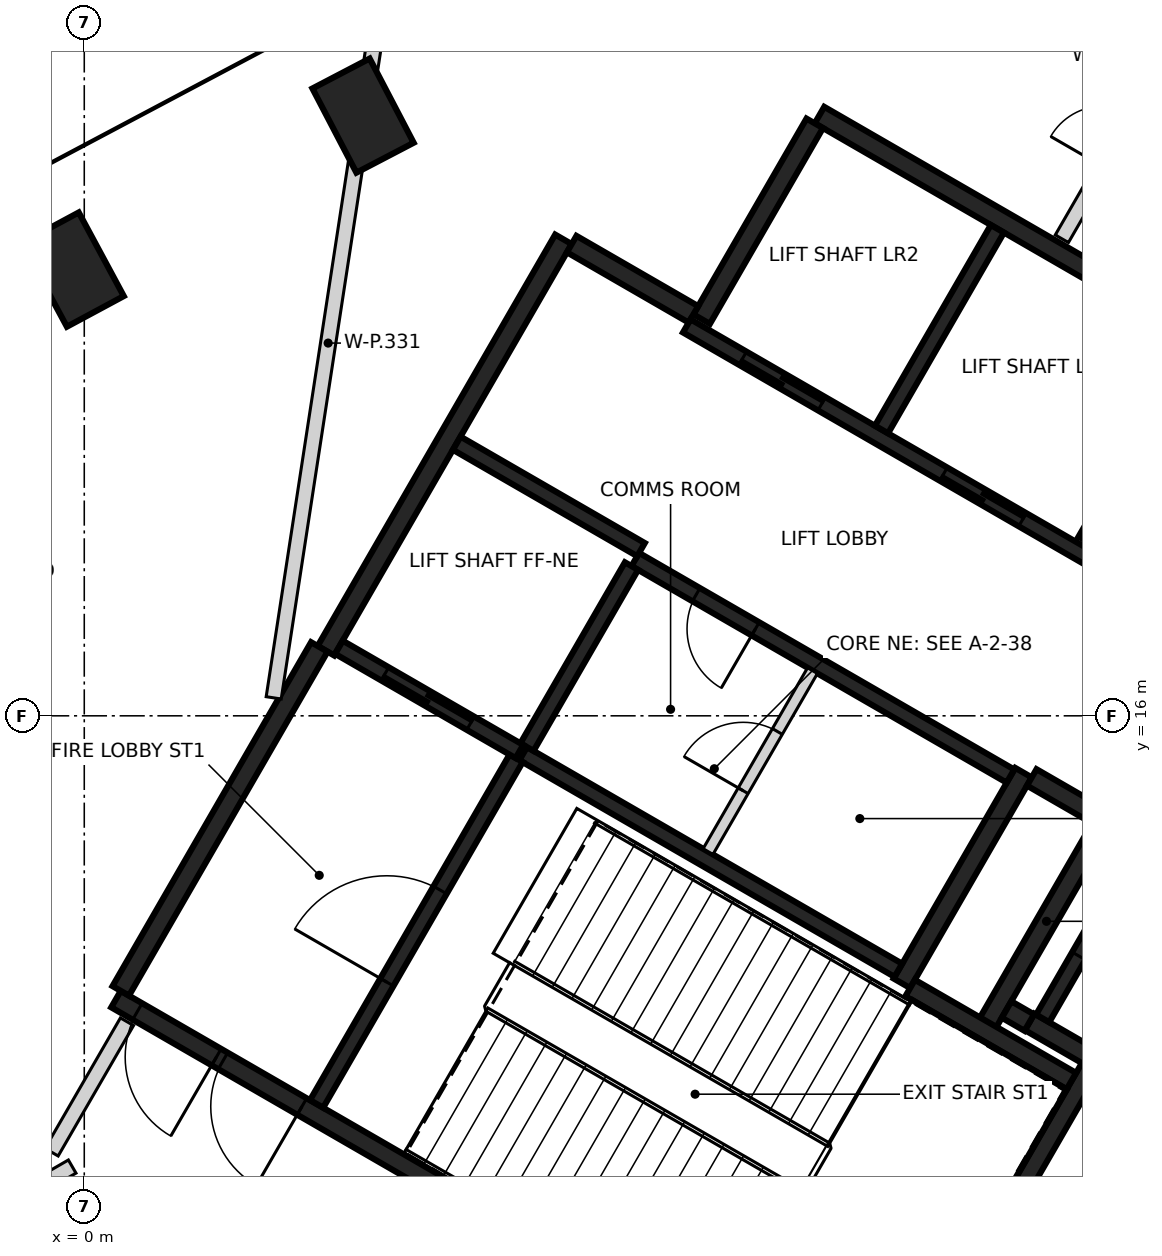
"""IFC4 building model, lengths in metres.
Left out: names, types, materials, properties, quantities, classifications, styles, units other than length and angle.
Written with IfcOpenShell. Run it as: python <this file> out.ifc"""

import sys

from ifc_helpers import new_model, si_unit, direction, frame, frame_2d, origin, origin_2d, place, context, subcontext, project, spatial, rectangle, extrude, element, fill, save


model = new_model("IFC4")
c1 = context("Model", 3, precision=1e-05, world=origin(), true_north=direction((0.0, 1.0)))
c2 = subcontext(c1, "Body", "Model", "MODEL_VIEW")
j1 = project(units=[si_unit("LENGTHUNIT", "METRE"), si_unit("PLANEANGLEUNIT", "RADIAN")], contexts=[c1])
p1 = place(None, origin())
s1 = spatial("IfcSite", under=j1, at=p1, CompositionType="ELEMENT")
p2 = place(p1, origin())
s2 = spatial("IfcBuilding", under=s1, at=p2, CompositionType="ELEMENT")
p3 = place(p2, frame((0.0, 0.0, 123.8)))
s3 = spatial("IfcBuildingStorey", under=s2, at=p3, CompositionType="ELEMENT", Elevation=123.8)
for number, where, z_axis, x_axis in (
    (1, (3.667, 23.896, -0.4), (0.0, 0.0, 1.0), (-0.463, 0.886, 0.0)),
    (2, (-0.151, 21.871, -0.4), (0.0, 0.0, 1.0), (-0.474, 0.881, 0.0)),
):
    element("IfcColumn", number, at=place(p3, frame(where, z_axis=z_axis, x_axis=x_axis)), inside=s3, PredefinedType="COLUMN", context=c2, shape_type="SweptSolid", body=[
        extrude(rectangle(XDim=1.25, YDim=0.85, at=origin_2d()), origin(), (0.0, 0.0, 1.0), 5.0),
    ])
p4 = place(p3, frame((15.207, 26.34, -0.4), z_axis=(0.0, 0.0, 1.0), x_axis=(0.5, 0.866025403784, 0.0)))
e3 = element("IfcColumn", 3, at=p4, inside=s3, PredefinedType="COLUMN", context=c2, shape_type="SweptSolid", body=[
    extrude(rectangle(XDim=3.6, YDim=3.0, at=origin_2d()), origin(), (0.0, 0.0, 1.0), 5.0),
])
p5 = place(p3, frame((10.42, 6.498, 0.0), z_axis=(0.0, 0.0, 1.0), x_axis=(-0.866021906294, 0.500006057782, 0.0)))
e4 = element("IfcWall", 4, at=p5, inside=s3, PredefinedType="SHEAR", context=c2, shape_type="SweptSolid", body=[
    extrude(rectangle(XDim=11.55, YDim=0.25, at=frame_2d((5.775, 0.0))), origin(), (0.0, 0.0, 1.0), 4.6),
])
p6 = place(p5, frame((10.025, 0.0, 0.0)))
e5 = element("IfcOpeningElement", 5, at=p6, cuts=e4, PredefinedType="OPENING", context=c2, shape_type="SweptSolid", body=[
    extrude(rectangle(XDim=1.2, YDim=2.1, at=frame_2d((0.6, 1.05))), frame((0.0, 0.135, 0.0), z_axis=(0.0, -1.0, 0.0), x_axis=(1.0, 0.0, 0.0)), (0.0, 0.0, 1.0), 0.27),
])
p7 = place(p5, frame((8.725, 0.0, 0.0)))
e6 = element("IfcOpeningElement", 6, at=p7, cuts=e4, PredefinedType="OPENING", context=c2, shape_type="SweptSolid", body=[
    extrude(rectangle(XDim=1.2, YDim=2.1, at=frame_2d((0.6, 1.05))), frame((0.0, 0.135, 0.0), z_axis=(0.0, -1.0, 0.0), x_axis=(1.0, 0.0, 0.0)), (0.0, 0.0, 1.0), 0.27),
])
p8 = place(p3, frame((3.179, 16.856, 0.0), z_axis=(0.0, 0.0, 1.0), x_axis=(0.500004234368, 0.866022959057, 0.0)))
e7 = element("IfcWall", 7, at=p8, inside=s3, PredefinedType="SHEAR", context=c2, shape_type="SweptSolid", body=[
    extrude(rectangle(XDim=6.25, YDim=0.25, at=frame_2d((3.125, 0.0))), origin(), (0.0, 0.0, 1.0), 4.6),
])
p9 = place(p3, frame((9.673, 23.903, 0.0), z_axis=(0.0, 0.0, 1.0), x_axis=(0.86603616409, -0.499981362141, 0.0)))
e8 = element("IfcWall", 8, at=p9, inside=s3, PredefinedType="SHEAR", context=c2, shape_type="SweptSolid", body=[
    extrude(rectangle(XDim=5.85, YDim=0.25, at=frame_2d((2.925, 0.0))), origin(), (0.0, 0.0, 1.0), 4.6),
])
p10 = place(p3, frame((0.48, 12.381, 0.0), z_axis=(0.0, 0.0, 1.0), x_axis=(0.49999885962, 0.866026062182, 0.0)))
e9 = element("IfcWall", 9, at=p10, inside=s3, PredefinedType="SHEAR", context=c2, shape_type="SweptSolid", body=[
    extrude(rectangle(XDim=5.225, YDim=0.25, at=frame_2d((2.612, 0.0))), origin(), (0.0, 0.0, 1.0), 4.6),
])
p11 = place(p3, frame((13.238, 11.378, 0.0), z_axis=(0.0, 0.0, 1.0), x_axis=(-0.500008851346, -0.866020293397, 0.0)))
e10 = element("IfcWall", 10, at=p11, inside=s3, PredefinedType="SHEAR", context=c2, shape_type="SweptSolid", body=[
    extrude(rectangle(XDim=5.51, YDim=0.25, at=frame_2d((2.755, 0.0))), origin(), (0.0, 0.0, 1.0), 4.6),
])
p12 = place(p3, frame((12.357, 15.252, 0.0), z_axis=(0.0, 0.0, 1.0), x_axis=(-0.500028443584, -0.866008981251, 0.0)))
e11 = element("IfcWall", 11, at=p12, inside=s3, PredefinedType="SHEAR", context=c2, shape_type="SweptSolid", body=[
    extrude(rectangle(XDim=3.2, YDim=0.25, at=frame_2d((1.6, 0.0))), origin(), (0.0, 0.0, 1.0), 4.6),
])
for number, where, z_axis, x_axis in (
    (12, (8.123, 21.219, 0.0), (0.0, 0.0, 1.0), (0.5, 0.866, 0.0)),
    (13, (14.676, 20.87, 0.0), (0.0, 0.0, 1.0), (-0.5, -0.866, 0.0)),
):
    element("IfcWall", number, at=place(p3, frame(where, z_axis=z_axis, x_axis=x_axis)), inside=s3, PredefinedType="SHEAR", context=c2, shape_type="SweptSolid", body=[
        extrude(rectangle(XDim=2.975, YDim=0.25, at=frame_2d((1.487, 0.0))), origin(), (0.0, 0.0, 1.0), 4.6),
    ])
p13 = place(p3, frame((14.918, 10.54, 0.0), z_axis=(0.0, 0.0, 1.0), x_axis=(-0.866063538972, 0.499933942099, 0.0)))
e14 = element("IfcWall", 14, at=p13, inside=s3, PredefinedType="SHEAR", context=c2, shape_type="SweptSolid", body=[
    extrude(rectangle(XDim=2.865, YDim=0.25, at=frame_2d((1.432, 0.0))), origin(), (0.0, 0.0, 1.0), 4.6),
])
p14 = place(p3, frame((11.888, 11.961, 0.0), z_axis=(0.0, 0.0, 1.0), x_axis=(0.500003324108, 0.866023484601, 0.0)))
e15 = element("IfcWall", 15, at=p14, inside=s3, PredefinedType="SHEAR", context=c2, shape_type="SweptSolid", body=[
    extrude(rectangle(XDim=3.085, YDim=0.25, at=frame_2d((1.542, 0.0))), origin(), (0.0, 0.0, 1.0), 4.6),
])
p15 = place(p3, frame((10.865, 12.418, 0.0), z_axis=(0.0, 0.0, 1.0), x_axis=(0.866026229868, -0.499998569178, 0.0)))
e16 = element("IfcWall", 16, at=p15, inside=s3, PredefinedType="SHEAR", context=c2, shape_type="SweptSolid", body=[
    extrude(rectangle(XDim=2.449, YDim=0.25, at=frame_2d((1.225, 0.0))), origin(), (0.0, 0.0, 1.0), 4.6),
])
p16 = place(p3, frame((6.413, 22.206, 0.0), z_axis=(0.0, 0.0, 1.0), x_axis=(0.866016279763, -0.500015802937, 0.0)))
e17 = element("IfcWall", 17, at=p16, inside=s3, PredefinedType="SHEAR", context=c2, shape_type="SweptSolid", body=[
    extrude(rectangle(XDim=1.849, YDim=0.25, at=frame_2d((0.925, 0.0))), origin(), (0.0, 0.0, 1.0), 4.6),
])
p17 = place(p3, frame((13.322, 14.695, 0.0), z_axis=(0.0, 0.0, 1.0), x_axis=(-0.866017078145, 0.500014420154, 0.0)))
e18 = element("IfcWall", 18, at=p17, inside=s3, PredefinedType="SHEAR", context=c2, shape_type="SweptSolid", body=[
    extrude(rectangle(XDim=0.989, YDim=0.25, at=frame_2d((0.495, 0.0))), origin(), (0.0, 0.0, 1.0), 4.6),
])
p18 = place(p3, frame((12.433, 11.964, 0.0), z_axis=(0.0, 0.0, 1.0), x_axis=(-0.866055875208, 0.499947218231, 0.0)))
e19 = element("IfcWall", 19, at=p18, inside=s3, PredefinedType="SHEAR", context=c2, shape_type="SweptSolid", body=[
    extrude(rectangle(XDim=0.345, YDim=0.25, at=frame_2d((0.172, 0.0))), origin(), (0.0, 0.0, 1.0), 4.6),
])
p19 = place(p3, frame((13.21, 18.08, 0.0), z_axis=(0.0, 0.0, 1.0), x_axis=(-0.866030299012, 0.499991521122, 0.0)))
e20 = element("IfcWall", 20, at=p19, inside=s3, PredefinedType="SHEAR", context=c2, shape_type="SweptSolid", body=[
    extrude(rectangle(XDim=6.1, YDim=0.2, at=frame_2d((3.05, 0.0))), origin(), (0.0, 0.0, 1.0), 4.6),
])
p20 = place(p19, frame((1.0, 0.0, 0.0)))
e21 = element("IfcOpeningElement", 21, at=p20, cuts=e20, PredefinedType="OPENING", context=c2, shape_type="SweptSolid", body=[
    extrude(rectangle(XDim=1.2, YDim=2.1, at=frame_2d((0.6, 1.05))), frame((0.0, 0.11, 0.0), z_axis=(0.0, -1.0, 0.0), x_axis=(1.0, 0.0, 0.0)), (0.0, 0.0, 1.0), 0.22),
])
p21 = place(p19, frame((4.05, 0.0, 0.0)))
e22 = element("IfcOpeningElement", 22, at=p21, cuts=e20, PredefinedType="OPENING", context=c2, shape_type="SweptSolid", body=[
    extrude(rectangle(XDim=1.2, YDim=2.1, at=frame_2d((0.6, 1.05))), frame((0.0, 0.11, 0.0), z_axis=(0.0, -1.0, 0.0), x_axis=(1.0, 0.0, 0.0)), (0.0, 0.0, 1.0), 0.22),
])
p22 = place(p3, frame((5.775, 15.502, 0.0), z_axis=(0.0, 0.0, 1.0), x_axis=(0.866020080793, -0.500009219579, 0.0)))
e23 = element("IfcWall", 23, at=p22, inside=s3, PredefinedType="SHEAR", context=c2, shape_type="SweptSolid", body=[
    extrude(rectangle(XDim=5.699, YDim=0.2, at=frame_2d((2.85, 0.0))), origin(), (0.0, 0.0, 1.0), 4.6),
])
p23 = place(p3, frame((12.185, 15.207, 0.0), z_axis=(0.0, 0.0, 1.0), x_axis=(-0.866020080793, 0.500009219579, 0.0)))
e24 = element("IfcWall", 24, at=p23, inside=s3, PredefinedType="SHEAR", context=c2, shape_type="SweptSolid", body=[
    extrude(rectangle(XDim=5.699, YDim=0.2, at=frame_2d((2.85, 0.0))), origin(), (0.0, 0.0, 1.0), 4.6),
])
p24 = place(p23, frame((3.874, 0.0, 0.0)))
e25 = element("IfcOpeningElement", 25, at=p24, cuts=e24, PredefinedType="OPENING", context=c2, shape_type="SweptSolid", body=[
    extrude(rectangle(XDim=0.9, YDim=2.1, at=frame_2d((0.45, 1.05))), frame((0.0, 0.11, 0.0), z_axis=(0.0, -1.0, 0.0), x_axis=(1.0, 0.0, 0.0)), (0.0, 0.0, 1.0), 0.22),
])
p25 = place(p3, frame((3.057, 10.895, 0.0), z_axis=(0.0, 0.0, 1.0), x_axis=(0.499989418164, 0.866031513124, 0.0)))
e26 = element("IfcWall", 26, at=p25, inside=s3, PredefinedType="SHEAR", context=c2, shape_type="SweptSolid", body=[
    extrude(rectangle(XDim=5.251, YDim=0.2, at=frame_2d((2.625, 0.0))), origin(), (0.0, 0.0, 1.0), 4.6),
])
p26 = place(p25, frame((1.849, 0.0, 0.0)))
e27 = element("IfcOpeningElement", 27, at=p26, cuts=e26, PredefinedType="OPENING", context=c2, shape_type="SweptSolid", body=[
    extrude(rectangle(XDim=1.4, YDim=2.1, at=frame_2d((0.7, 1.05))), frame((0.0, 0.11, 0.0), z_axis=(0.0, -1.0, 0.0), x_axis=(1.0, 0.0, 0.0)), (0.0, 0.0, 1.0), 0.22),
])
p27 = place(p3, frame((10.489, 19.767, 0.0), z_axis=(0.0, 0.0, 1.0), x_axis=(0.499946628782, 0.866056215479, 0.0)))
e28 = element("IfcWall", 28, at=p27, inside=s3, PredefinedType="SHEAR", context=c2, shape_type="SweptSolid", body=[
    extrude(rectangle(XDim=3.048, YDim=0.2, at=frame_2d((1.524, 0.0))), origin(), (0.0, 0.0, 1.0), 4.6),
])
p28 = place(p3, frame((14.008, 14.442, 0.0), z_axis=(0.0, 0.0, 1.0), x_axis=(-0.499986818241, -0.866033014143, 0.0)))
e29 = element("IfcWall", 29, at=p28, inside=s3, PredefinedType="SHEAR", context=c2, shape_type="SweptSolid", body=[
    extrude(rectangle(XDim=2.798, YDim=0.2, at=frame_2d((1.399, 0.0))), origin(), (0.0, 0.0, 1.0), 4.6),
])
p29 = place(p28, frame((0.949, 0.0, 0.0)))
e30 = element("IfcOpeningElement", 30, at=p29, cuts=e29, PredefinedType="OPENING", context=c2, shape_type="SweptSolid", body=[
    extrude(rectangle(XDim=0.9, YDim=2.1, at=frame_2d((0.45, 1.05))), frame((0.0, 0.11, 0.0), z_axis=(0.0, -1.0, 0.0), x_axis=(1.0, 0.0, 0.0)), (0.0, 0.0, 1.0), 0.22),
])
p30 = place(p3, frame((7.199, 17.97, 0.0), z_axis=(0.0, 0.0, 1.0), x_axis=(-0.499968400327, -0.866043647095, 0.0)))
e31 = element("IfcWall", 31, at=p30, inside=s3, PredefinedType="SHEAR", context=c2, shape_type="SweptSolid", body=[
    extrude(rectangle(XDim=2.75, YDim=0.2, at=frame_2d((1.375, 0.0))), origin(), (0.0, 0.0, 1.0), 4.6),
])
p31 = place(p3, frame((5.725, 15.531, 0.0), z_axis=(0.0, 0.0, 1.0), x_axis=(-0.866037306777, 0.499979382845, 0.0)))
e32 = element("IfcWall", 32, at=p31, inside=s3, PredefinedType="SHEAR", context=c2, shape_type="SweptSolid", body=[
    extrude(rectangle(XDim=2.742, YDim=0.2, at=frame_2d((1.371, 0.0))), origin(), (0.0, 0.0, 1.0), 4.6),
])
p32 = place(p31, frame((0.743, 0.0, 0.0)))
e33 = element("IfcOpeningElement", 33, at=p32, cuts=e32, PredefinedType="OPENING", context=c2, shape_type="SweptSolid", body=[
    extrude(rectangle(XDim=1.3, YDim=2.1, at=frame_2d((0.65, 1.05))), frame((0.0, 0.11, 0.0), z_axis=(0.0, -1.0, 0.0), x_axis=(1.0, 0.0, 0.0)), (0.0, 0.0, 1.0), 0.22),
])
p33 = place(p3, frame((4.901, 19.586, 0.0), z_axis=(0.0, 0.0, 1.0), x_axis=(0.866022890907, -0.500004352405, 0.0)))
e34 = element("IfcWall", 34, at=p33, inside=s3, PredefinedType="SHEAR", context=c2, shape_type="SweptSolid", body=[
    extrude(rectangle(XDim=2.799, YDim=0.2, at=frame_2d((1.399, 0.0))), origin(), (0.0, 0.0, 1.0), 4.6),
])
p34 = place(p3, frame((8.207, 14.214, 0.0), z_axis=(0.0, 0.0, 1.0), x_axis=(0.499922376475, 0.866070215109, 0.0)))
e35 = element("IfcWall", 35, at=p34, inside=s3, PredefinedType="PARTITIONING", context=c2, shape_type="SweptSolid", body=[
    extrude(rectangle(XDim=2.749, YDim=0.15, at=frame_2d((1.374, 0.0))), origin(), (0.0, 0.0, 1.0), 4.6),
])
p35 = place(p34, frame((0.924, 0.0, 0.0)))
e36 = element("IfcOpeningElement", 36, at=p35, cuts=e35, PredefinedType="OPENING", context=c2, shape_type="SweptSolid", body=[
    extrude(rectangle(XDim=0.9, YDim=2.1, at=frame_2d((0.45, 1.05))), frame((0.0, 0.085, 0.0), z_axis=(0.0, -1.0, 0.0), x_axis=(1.0, 0.0, 0.0)), (0.0, 0.0, 1.0), 0.17),
])
p36 = place(p3, frame((-7.674, 5.728, 0.0), z_axis=(0.0, 0.0, 1.0), x_axis=(0.865879153223, 0.50025322789, 0.0)))
e37 = element("IfcWall", 37, at=p36, inside=s3, PredefinedType="PARTITIONING", context=c2, shape_type="SweptSolid", body=[
    extrude(rectangle(XDim=8.679, YDim=0.2, at=frame_2d((4.34, 0.0))), origin(), (0.0, 0.0, 1.0), 4.6),
])
p37 = place(p36, frame((6.16, 0.0, 0.0)))
e38 = element("IfcOpeningElement", 38, at=p37, cuts=e37, PredefinedType="OPENING", context=c2, shape_type="SweptSolid", body=[
    extrude(rectangle(XDim=2.0, YDim=2.1, at=frame_2d((1.0, 1.05))), frame((0.0, 0.11, 0.0), z_axis=(0.0, -1.0, 0.0), x_axis=(1.0, 0.0, 0.0)), (0.0, 0.0, 1.0), 0.22),
])
p38 = place(p36, frame((3.77, 0.0, 0.0)))
e39 = element("IfcOpeningElement", 39, at=p38, cuts=e37, PredefinedType="OPENING", context=c2, shape_type="SweptSolid", body=[
    extrude(rectangle(XDim=0.9, YDim=2.1, at=frame_2d((0.45, 1.05))), frame((0.0, 0.11, 0.0), z_axis=(0.0, -1.0, 0.0), x_axis=(1.0, 0.0, 0.0)), (0.0, 0.0, 1.0), 0.22),
])
p39 = place(p3, frame((-0.43, 10.259, 0.0), z_axis=(0.0, 0.0, 1.0), x_axis=(0.500283752163, 0.865861517404, 0.0)))
e40 = element("IfcWall", 40, at=p39, inside=s3, PredefinedType="PARTITIONING", context=c2, shape_type="SweptSolid", body=[
    extrude(rectangle(XDim=1.983, YDim=0.2, at=frame_2d((0.991, 0.0))), origin(), (0.0, 0.0, 1.0), 4.6),
])
p40 = place(p3, frame((2.492, 16.236, 0.0), z_axis=(0.0, 0.0, 1.0), x_axis=(0.151721108942, 0.988423343058, 0.0)))
e41 = element("IfcWall", 41, at=p40, inside=s3, PredefinedType="PARTITIONING", context=c2, shape_type="SweptSolid", body=[
    extrude(rectangle(XDim=9.444, YDim=0.2, at=frame_2d((4.722, 0.0))), origin(), (0.0, 0.0, 1.0), 4.6),
])
p41 = place(p3, frame((12.861, 22.276, 0.0), z_axis=(0.0, 0.0, 1.0), x_axis=(0.500132837022, 0.865948696709, 0.0)))
e42 = element("IfcWall", 42, at=p41, inside=s3, PredefinedType="PARTITIONING", context=c2, shape_type="SweptSolid", body=[
    extrude(rectangle(XDim=7.587, YDim=0.2, at=frame_2d((3.793, 0.0))), origin(), (0.0, 0.0, 1.0), 4.6),
])
p42 = place(p41, frame((1.092, 0.0, 0.0)))
e43 = element("IfcOpeningElement", 43, at=p42, cuts=e42, PredefinedType="OPENING", context=c2, shape_type="SweptSolid", body=[
    extrude(rectangle(XDim=0.8, YDim=2.1, at=frame_2d((0.4, 1.05))), frame((0.0, 0.11, 0.0), z_axis=(0.0, -1.0, 0.0), x_axis=(1.0, 0.0, 0.0)), (0.0, 0.0, 1.0), 0.22),
])
p43 = place(p32, origin())
e44 = element("IfcDoor", 44, at=p43, inside=s3, OperationType="SLIDING_TO_RIGHT", PredefinedType="DOOR", context=c2, shape_type="SweptSolid", body=[
    extrude(rectangle(XDim=1.3, YDim=2.1, at=frame_2d((0.65, 1.05))), frame((0.0, 0.025, 0.0), z_axis=(0.0, -1.0, 0.0), x_axis=(1.0, 0.0, 0.0)), (0.0, 0.0, 1.0), 0.05),
])
fill(e33, e44)
p44 = place(p20, origin())
e45 = element("IfcDoor", 45, at=p44, inside=s3, OperationType="DOUBLE_DOOR_SLIDING", PredefinedType="DOOR", context=c2, shape_type="SweptSolid", body=[
    extrude(rectangle(XDim=1.2, YDim=2.1, at=frame_2d((0.6, 1.05))), frame((0.0, 0.025, 0.0), z_axis=(0.0, -1.0, 0.0), x_axis=(1.0, 0.0, 0.0)), (0.0, 0.0, 1.0), 0.05),
])
fill(e21, e45)
p45 = place(p21, origin())
e46 = element("IfcDoor", 46, at=p45, inside=s3, OperationType="DOUBLE_DOOR_SLIDING", PredefinedType="DOOR", context=c2, shape_type="SweptSolid", body=[
    extrude(rectangle(XDim=1.2, YDim=2.1, at=frame_2d((0.6, 1.05))), frame((0.0, 0.025, 0.0), z_axis=(0.0, -1.0, 0.0), x_axis=(1.0, 0.0, 0.0)), (0.0, 0.0, 1.0), 0.05),
])
fill(e22, e46)
p46 = place(p6, origin())
e47 = element("IfcDoor", 47, at=p46, inside=s3, OperationType="SINGLE_SWING_LEFT", PredefinedType="DOOR", context=c2, shape_type="SweptSolid", body=[
    extrude(rectangle(XDim=1.2, YDim=2.1, at=frame_2d((0.6, 1.05))), frame((0.0, 0.025, 0.0), z_axis=(0.0, -1.0, 0.0), x_axis=(1.0, 0.0, 0.0)), (0.0, 0.0, 1.0), 0.05),
])
fill(e5, e47)
p47 = place(p7, origin())
e48 = element("IfcDoor", 48, at=p47, inside=s3, OperationType="SINGLE_SWING_RIGHT", PredefinedType="DOOR", context=c2, shape_type="SweptSolid", body=[
    extrude(rectangle(XDim=1.2, YDim=2.1, at=frame_2d((0.6, 1.05))), frame((0.0, 0.025, 0.0), z_axis=(0.0, -1.0, 0.0), x_axis=(1.0, 0.0, 0.0)), (0.0, 0.0, 1.0), 0.05),
])
fill(e6, e48)
p48 = place(p26, origin())
e49 = element("IfcDoor", 49, at=p48, inside=s3, OperationType="SINGLE_SWING_RIGHT", PredefinedType="DOOR", context=c2, shape_type="SweptSolid", body=[
    extrude(rectangle(XDim=1.4, YDim=2.1, at=frame_2d((0.7, 1.05))), frame((0.0, 0.025, 0.0), z_axis=(0.0, -1.0, 0.0), x_axis=(1.0, 0.0, 0.0)), (0.0, 0.0, 1.0), 0.05),
])
fill(e27, e49)
p49 = place(p24, origin())
e50 = element("IfcDoor", 50, at=p49, inside=s3, OperationType="SINGLE_SWING_LEFT", PredefinedType="DOOR", context=c2, shape_type="SweptSolid", body=[
    extrude(rectangle(XDim=0.9, YDim=2.1, at=frame_2d((0.45, 1.05))), frame((0.0, 0.025, 0.0), z_axis=(0.0, -1.0, 0.0), x_axis=(1.0, 0.0, 0.0)), (0.0, 0.0, 1.0), 0.05),
])
fill(e25, e50)
p50 = place(p29, origin())
e51 = element("IfcDoor", 51, at=p50, inside=s3, OperationType="SINGLE_SWING_RIGHT", PredefinedType="DOOR", context=c2, shape_type="SweptSolid", body=[
    extrude(rectangle(XDim=0.9, YDim=2.1, at=frame_2d((0.45, 1.05))), frame((0.0, 0.025, 0.0), z_axis=(0.0, -1.0, 0.0), x_axis=(1.0, 0.0, 0.0)), (0.0, 0.0, 1.0), 0.05),
])
fill(e30, e51)
p51 = place(p35, origin())
e52 = element("IfcDoor", 52, at=p51, inside=s3, OperationType="SINGLE_SWING_LEFT", PredefinedType="DOOR", context=c2, shape_type="SweptSolid", body=[
    extrude(rectangle(XDim=0.9, YDim=2.1, at=frame_2d((0.45, 1.05))), frame((0.0, 0.025, 0.0), z_axis=(0.0, -1.0, 0.0), x_axis=(1.0, 0.0, 0.0)), (0.0, 0.0, 1.0), 0.05),
])
fill(e36, e52)
save(model, sys.argv[1])
